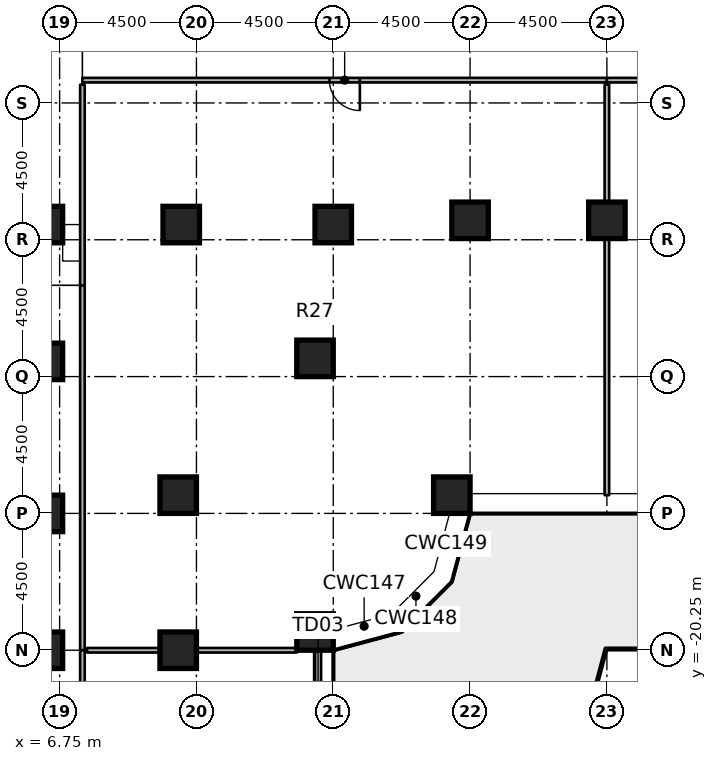
"""IFC4 building model, lengths in metres.
Left out: names, types, materials, properties, quantities, classifications, styles, units other than length and angle.
Written with IfcOpenShell. Run it as: python <this file> out.ifc"""

import sys

from ifc_helpers import new_model, si_unit, direction, frame, frame_2d, origin, origin_2d, place, context, subcontext, project, spatial, rectangle, extrude, element, fill, save


model = new_model("IFC4")
c1 = context("Model", 3, precision=1e-05, world=origin(), true_north=direction((0.0, 1.0)))
c2 = subcontext(c1, "Body", "Model", "MODEL_VIEW")
j1 = project(units=[si_unit("LENGTHUNIT", "METRE"), si_unit("PLANEANGLEUNIT", "RADIAN")], contexts=[c1])
p1 = place(None, origin())
s1 = spatial("IfcSite", under=j1, at=p1, CompositionType="ELEMENT")
p2 = place(p1, origin())
s2 = spatial("IfcBuilding", under=s1, at=p2, CompositionType="ELEMENT")
p3 = place(p2, frame((0.0, 0.0, 17.0)))
s3 = spatial("IfcBuildingStorey", under=s2, at=p3, CompositionType="ELEMENT", Elevation=17.0)
for number, where, z_axis, x_axis in (
    (1, (6.25, -20.25, 0.0), (0.0, 0.0, 1.0), (1.0, 0.0, 0.0)),
    (2, (6.25, -15.75, 0.0), (0.0, 0.0, 1.0), (1.0, 0.0, 0.0)),
    (3, (6.25, -10.75, 0.0), (0.0, 0.0, 1.0), (1.0, 0.0, 0.0)),
    (4, (6.25, -6.25, 0.0), (0.0, 0.0, 1.0), (1.0, 0.0, 0.0)),
    (5, (10.65, -20.25, 0.0), (0.0, 0.0, 1.0), (1.0, 0.0, 0.0)),
    (6, (10.65, -15.15, 0.0), (0.0, 0.0, 1.0), (1.0, 0.0, 0.0)),
    (7, (10.75, -6.25, 0.0), (0.0, 0.0, 1.0), (1.0, 0.0, 0.0)),
    (8, (15.15, -19.65, 0.0), (0.0, 0.0, 1.0), (1.0, 0.0, 0.0)),
    (9, (15.15, -10.65, 0.0), (0.0, 0.0, 1.0), (1.0, 0.0, 0.0)),
    (10, (15.75, -6.25, 0.0), (0.0, 0.0, 1.0), (1.0, 0.0, 0.0)),
    (11, (19.65, -15.15, 0.0), (0.0, 0.0, 1.0), (1.0, 0.0, 0.0)),
    (12, (20.25, -6.11, 0.0), (0.0, 0.0, 1.0), (1.0, 0.0, 0.0)),
    (13, (24.75, -6.11, 0.0), (0.0, 0.0, 1.0), (1.0, 0.0, 0.0)),
):
    element("IfcColumn", number, at=place(p3, frame(where, z_axis=z_axis, x_axis=x_axis)), inside=s3, PredefinedType="COLUMN", context=c2, shape_type="SweptSolid", body=[
        extrude(rectangle(XDim=1.2, YDim=1.2, at=origin_2d()), origin(), (0.0, 0.0, 1.0), 4.55),
    ])
p4 = place(p3, frame((15.25, -24.15, 0.0), z_axis=(0.0, 0.0, 1.0), x_axis=(0.0, 1.0, 0.0)))
e14 = element("IfcWall", 14, at=p4, inside=s3, PredefinedType="SOLIDWALL", context=c2, shape_type="SweptSolid", body=[
    extrude(rectangle(XDim=3.9, YDim=0.2, at=frame_2d((1.95, 0.0))), origin(), (0.0, 0.0, 1.0), 4.55),
])
p5 = place(p4, frame((1.05, 0.0, 0.0)))
e15 = element("IfcOpeningElement", 15, at=p5, cuts=e14, PredefinedType="OPENING", context=c2, shape_type="SweptSolid", body=[
    extrude(rectangle(XDim=1.8, YDim=2.4, at=frame_2d((0.9, 1.2))), frame((0.0, 0.11, 0.0), z_axis=(0.0, -1.0, 0.0), x_axis=(1.0, 0.0, 0.0)), (0.0, 0.0, 1.0), 0.22),
])
p6 = place(p3, frame((7.5, -8.25, 0.0), z_axis=(0.0, 0.0, 1.0), x_axis=(0.0, -1.0, 0.0)))
e16 = element("IfcWall", 16, at=p6, inside=s3, PredefinedType="PARTITIONING", context=c2, shape_type="SweptSolid", body=[
    extrude(rectangle(XDim=12.0, YDim=0.15, at=frame_2d((6.0, 0.0))), origin(), (0.0, 0.0, 1.0), 4.55),
])
p7 = place(p3, frame((7.5, -20.25, 0.0), z_axis=(0.0, 0.0, 1.0), x_axis=(0.0, -1.0, 0.0)))
e17 = element("IfcWall", 17, at=p7, inside=s3, PredefinedType="PARTITIONING", context=c2, shape_type="SweptSolid", body=[
    extrude(rectangle(XDim=12.0, YDim=0.15, at=frame_2d((6.0, 0.0))), origin(), (0.0, 0.0, 1.0), 4.55),
])
p8 = place(p7, frame((7.5, 0.0, 0.0)))
e18 = element("IfcOpeningElement", 18, at=p8, cuts=e17, PredefinedType="OPENING", context=c2, shape_type="SweptSolid", body=[
    extrude(rectangle(XDim=0.9, YDim=2.1, at=frame_2d((0.45, 1.05))), frame((0.0, 0.085, 0.0), z_axis=(0.0, -1.0, 0.0), x_axis=(1.0, 0.0, 0.0)), (0.0, 0.0, 1.0), 0.17),
])
p9 = place(p3, frame((24.75, -1.5, 0.0), z_axis=(0.0, 0.0, 1.0), x_axis=(-1.0, 0.0, 0.0)))
e19 = element("IfcWall", 19, at=p9, inside=s3, PredefinedType="PARTITIONING", context=c2, shape_type="SweptSolid", body=[
    extrude(rectangle(XDim=17.25, YDim=0.15, at=frame_2d((8.625, 0.0))), origin(), (0.0, 0.0, 1.0), 4.55),
])
p10 = place(p9, frame((8.125, 0.0, 0.0)))
e20 = element("IfcOpeningElement", 20, at=p10, cuts=e19, PredefinedType="OPENING", context=c2, shape_type="SweptSolid", body=[
    extrude(rectangle(XDim=1.0, YDim=2.1, at=frame_2d((0.5, 1.05))), frame((0.0, 0.085, 0.0), z_axis=(0.0, -1.0, 0.0), x_axis=(1.0, 0.0, 0.0)), (0.0, 0.0, 1.0), 0.17),
])
p11 = place(p3, frame((42.15, -1.5, 0.0), z_axis=(0.0, 0.0, 1.0), x_axis=(-1.0, 0.0, 0.0)))
e21 = element("IfcWall", 21, at=p11, inside=s3, PredefinedType="PARTITIONING", context=c2, shape_type="SweptSolid", body=[
    extrude(rectangle(XDim=17.4, YDim=0.15, at=frame_2d((8.7, 0.0))), origin(), (0.0, 0.0, 1.0), 4.55),
])
p12 = place(p11, frame((7.4, 0.0, 0.0)))
e22 = element("IfcOpeningElement", 22, at=p12, cuts=e21, PredefinedType="OPENING", context=c2, shape_type="SweptSolid", body=[
    extrude(rectangle(XDim=0.9, YDim=2.1, at=frame_2d((0.45, 1.05))), frame((0.0, 0.085, 0.0), z_axis=(0.0, -1.0, 0.0), x_axis=(1.0, 0.0, 0.0)), (0.0, 0.0, 1.0), 0.17),
])
p13 = place(p3, frame((24.75, -1.65, 0.0), z_axis=(0.0, 0.0, 1.0), x_axis=(0.0, -1.0, 0.0)))
e23 = element("IfcWall", 23, at=p13, inside=s3, PredefinedType="PARTITIONING", context=c2, shape_type="SweptSolid", body=[
    extrude(rectangle(XDim=3.86, YDim=0.15, at=frame_2d((1.93, 0.0))), origin(), (0.0, 0.0, 1.0), 4.55),
])
p14 = place(p3, frame((24.75, -6.71, 0.0), z_axis=(0.0, 0.0, 1.0), x_axis=(0.0, -1.0, 0.0)))
e24 = element("IfcWall", 24, at=p14, inside=s3, PredefinedType="PARTITIONING", context=c2, shape_type="SweptSolid", body=[
    extrude(rectangle(XDim=8.44, YDim=0.15, at=frame_2d((4.22, 0.0))), origin(), (0.0, 0.0, 1.0), 4.55),
])
p15 = place(p3, frame((14.55, -20.25, 0.0), z_axis=(0.0, 0.0, 1.0), x_axis=(-1.0, 0.0, 0.0)))
e25 = element("IfcWall", 25, at=p15, inside=s3, PredefinedType="PARTITIONING", context=c2, shape_type="SweptSolid", body=[
    extrude(rectangle(XDim=3.3, YDim=0.15, at=frame_2d((1.65, 0.0))), origin(), (0.0, 0.0, 1.0), 4.55),
])
p16 = place(p3, frame((10.05, -20.25, 0.0), z_axis=(0.0, 0.0, 1.0), x_axis=(-1.0, 0.0, 0.0)))
e26 = element("IfcWall", 26, at=p16, inside=s3, PredefinedType="PARTITIONING", context=c2, shape_type="SweptSolid", body=[
    extrude(rectangle(XDim=2.4, YDim=0.15, at=frame_2d((1.2, 0.0))), origin(), (0.0, 0.0, 1.0), 4.55),
])
p17 = place(p3, frame((7.5, -8.25, 0.0), z_axis=(0.0, 0.0, 1.0), x_axis=(0.0, 1.0, 0.0)))
e27 = element("IfcWall", 27, at=p17, inside=s3, PredefinedType="PARTITIONING", context=c2, shape_type="SweptSolid", body=[
    extrude(rectangle(XDim=6.6, YDim=0.15, at=frame_2d((3.3, 0.0))), origin(), (0.0, 0.0, 1.0), 4.55),
])
p18 = place(p10, origin())
e28 = element("IfcDoor", 28, at=p18, inside=s3, OperationType="SINGLE_SWING_LEFT", PredefinedType="DOOR", context=c2, shape_type="SweptSolid", body=[
    extrude(rectangle(XDim=1.0, YDim=2.1, at=frame_2d((0.5, 1.05))), frame((0.0, 0.025, 0.0), z_axis=(0.0, -1.0, 0.0), x_axis=(1.0, 0.0, 0.0)), (0.0, 0.0, 1.0), 0.05),
])
fill(e20, e28)
save(model, sys.argv[1])
